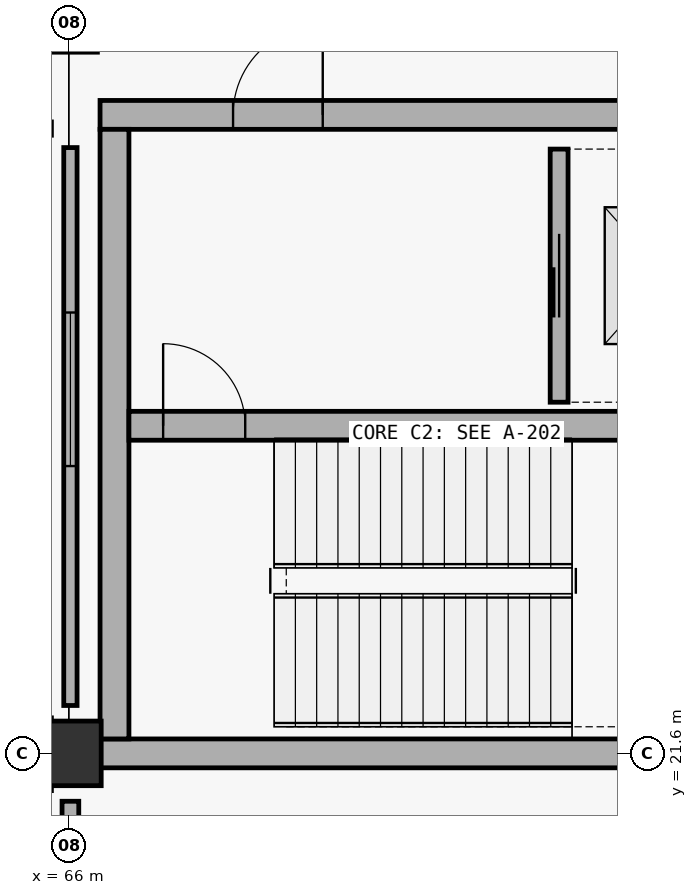
"""IFC4 building model, lengths in metres.
Left out: names, types, materials, properties, quantities, classifications, styles, units other than length and angle.
Written with IfcOpenShell. Run it as: python <this file> out.ifc"""

import sys

from ifc_helpers import new_model, si_unit, direction, frame, frame_2d, origin, origin_2d, place, context, subcontext, project, spatial, rectangle, extrude, element, fill, save


model = new_model("IFC4")
c1 = context("Model", 3, precision=1e-05, world=origin(), true_north=direction((0.0, 1.0)))
c2 = subcontext(c1, "Body", "Model", "MODEL_VIEW")
j1 = project(units=[si_unit("LENGTHUNIT", "METRE"), si_unit("PLANEANGLEUNIT", "RADIAN")], contexts=[c1])
p1 = place(None, origin())
s1 = spatial("IfcSite", under=j1, at=p1, CompositionType="ELEMENT")
p2 = place(p1, origin())
s2 = spatial("IfcBuilding", under=s1, at=p2, CompositionType="ELEMENT")
p3 = place(p2, frame((0.0, 0.0, 10.5)))
s3 = spatial("IfcBuildingStorey", under=s2, at=p3, CompositionType="ELEMENT", Elevation=10.5)
p4 = place(p3, frame((66.0, 21.6, 0.0), z_axis=(0.0, 0.0, 1.0), x_axis=(1.0, 0.0, 0.0)))
e1 = element("IfcColumn", 1, at=p4, inside=s3, PredefinedType="COLUMN", context=c2, shape_type="SweptSolid", body=[
    extrude(rectangle(XDim=0.85, YDim=0.85, at=origin_2d()), origin(), (0.0, 0.0, 1.0), 5.1),
])
p5 = place(p3, frame((66.41, 21.6, 0.0), z_axis=(0.0, 0.0, 1.0), x_axis=(1.0, 0.0, 0.0)))
e2 = element("IfcWall", 2, at=p5, inside=s3, PredefinedType="SHEAR", context=c2, shape_type="SweptSolid", body=[
    extrude(rectangle(XDim=9.38, YDim=0.38, at=frame_2d((4.69, 0.0))), origin(), (0.0, 0.0, 1.0), 5.1),
])
p6 = place(p3, frame((66.41, 30.0, 0.0), z_axis=(0.0, 0.0, 1.0), x_axis=(1.0, 0.0, 0.0)))
e3 = element("IfcWall", 3, at=p6, inside=s3, PredefinedType="SHEAR", context=c2, shape_type="SweptSolid", body=[
    extrude(rectangle(XDim=9.38, YDim=0.38, at=frame_2d((4.69, 0.0))), origin(), (0.0, 0.0, 1.0), 5.1),
])
p7 = place(p6, frame((1.75, 0.0, 0.0)))
e4 = element("IfcOpeningElement", 4, at=p7, cuts=e3, PredefinedType="OPENING", context=c2, shape_type="SweptSolid", body=[
    extrude(rectangle(XDim=1.18, YDim=2.24, at=frame_2d((0.59, 1.12))), frame((0.0, 0.2, 0.0), z_axis=(0.0, -1.0, 0.0), x_axis=(1.0, 0.0, 0.0)), (0.0, 0.0, 1.0), 0.4),
])
p8 = place(p3, frame((66.6, 21.79, 0.0), z_axis=(0.0, 0.0, 1.0), x_axis=(0.0, 1.0, 0.0)))
e5 = element("IfcWall", 5, at=p8, inside=s3, PredefinedType="SHEAR", context=c2, shape_type="SweptSolid", body=[
    extrude(rectangle(XDim=8.02, YDim=0.38, at=frame_2d((4.01, 0.0))), origin(), (0.0, 0.0, 1.0), 5.1),
])
p9 = place(p3, frame((66.79, 25.91, 0.0), z_axis=(0.0, 0.0, 1.0), x_axis=(1.0, 0.0, 0.0)))
e6 = element("IfcWall", 6, at=p9, inside=s3, PredefinedType="SHEAR", context=c2, shape_type="SweptSolid", body=[
    extrude(rectangle(XDim=8.62, YDim=0.38, at=frame_2d((4.31, 0.0))), origin(), (0.0, 0.0, 1.0), 5.1),
])
p10 = place(p9, frame((0.45, 0.0, 0.0)))
e7 = element("IfcOpeningElement", 7, at=p10, cuts=e6, PredefinedType="OPENING", context=c2, shape_type="SweptSolid", body=[
    extrude(rectangle(XDim=1.08, YDim=2.18, at=frame_2d((0.54, 1.09))), frame((0.0, 0.2, 0.0), z_axis=(0.0, -1.0, 0.0), x_axis=(1.0, 0.0, 0.0)), (0.0, 0.0, 1.0), 0.4),
])
p11 = place(p3, frame((72.45, 26.22, 0.0), z_axis=(0.0, 0.0, 1.0), x_axis=(0.0, 1.0, 0.0)))
e8 = element("IfcWall", 8, at=p11, inside=s3, PredefinedType="PARTITIONING", context=c2, shape_type="SweptSolid", body=[
    extrude(rectangle(XDim=3.33, YDim=0.235, at=frame_2d((1.665, 0.0))), origin(), (0.0, 0.0, 1.0), 4.72),
])
p12 = place(p11, frame((1.115, 0.0, 0.0)))
e9 = element("IfcOpeningElement", 9, at=p12, cuts=e8, PredefinedType="OPENING", context=c2, shape_type="SweptSolid", body=[
    extrude(rectangle(XDim=1.1, YDim=2.2, at=frame_2d((0.55, 1.1))), frame((0.0, 0.127, 0.0), z_axis=(0.0, -1.0, 0.0), x_axis=(1.0, 0.0, 0.0)), (0.0, 0.0, 1.0), 0.255),
])
p13 = place(p3, frame((66.02, 22.23, 0.0), z_axis=(0.0, 0.0, 1.0), x_axis=(0.0, 1.0, 0.0)))
e10 = element("IfcWall", 10, at=p13, inside=s3, PredefinedType="PARTITIONING", context=c2, shape_type="SweptSolid", body=[
    extrude(rectangle(XDim=7.34, YDim=0.175, at=frame_2d((3.67, 0.0))), origin(), (0.0, 0.0, 1.0), 4.0),
])
p14 = place(p13, frame((3.15, 0.0, 0.9)))
e11 = element("IfcOpeningElement", 11, at=p14, cuts=e10, PredefinedType="OPENING", context=c2, shape_type="SweptSolid", body=[
    extrude(rectangle(XDim=2.02, YDim=1.32, at=frame_2d((1.01, 0.66))), frame((0.0, 0.097, 0.0), z_axis=(0.0, -1.0, 0.0), x_axis=(1.0, 0.0, 0.0)), (0.0, 0.0, 1.0), 0.195),
])
p15 = place(p3, frame((66.02, 14.03, 0.0), z_axis=(0.0, 0.0, 1.0), x_axis=(0.0, 1.0, 0.0)))
e12 = element("IfcWall", 12, at=p15, inside=s3, PredefinedType="PARTITIONING", context=c2, shape_type="SweptSolid", body=[
    extrude(rectangle(XDim=6.94, YDim=0.22, at=frame_2d((3.47, 0.0))), origin(), (0.0, 0.0, 1.0), 4.1),
])
p16 = place(p15, frame((2.4, 0.0, 0.9)))
e13 = element("IfcOpeningElement", 13, at=p16, cuts=e12, PredefinedType="OPENING", context=c2, shape_type="SweptSolid", body=[
    extrude(rectangle(XDim=2.16, YDim=1.42, at=frame_2d((1.08, 0.71))), frame((0.0, 0.12, 0.0), z_axis=(0.0, -1.0, 0.0), x_axis=(1.0, 0.0, 0.0)), (0.0, 0.0, 1.0), 0.24),
])
p17 = place(p10, origin())
e14 = element("IfcDoor", 14, at=p17, inside=s3, OperationType="SINGLE_SWING_LEFT", PredefinedType="DOOR", context=c2, shape_type="SweptSolid", body=[
    extrude(rectangle(XDim=1.08, YDim=2.18, at=frame_2d((0.54, 1.09))), frame((0.0, 0.025, 0.0), z_axis=(0.0, -1.0, 0.0), x_axis=(1.0, 0.0, 0.0)), (0.0, 0.0, 1.0), 0.05),
])
fill(e7, e14)
p18 = place(p7, origin())
e15 = element("IfcDoor", 15, at=p18, inside=s3, OperationType="SINGLE_SWING_RIGHT", PredefinedType="DOOR", context=c2, shape_type="SweptSolid", body=[
    extrude(rectangle(XDim=1.18, YDim=2.24, at=frame_2d((0.59, 1.12))), frame((0.0, 0.025, 0.0), z_axis=(0.0, -1.0, 0.0), x_axis=(1.0, 0.0, 0.0)), (0.0, 0.0, 1.0), 0.05),
])
fill(e4, e15)
p19 = place(p12, origin())
e16 = element("IfcDoor", 16, at=p19, inside=s3, OperationType="SLIDING_TO_LEFT", PredefinedType="DOOR", context=c2, shape_type="SweptSolid", body=[
    extrude(rectangle(XDim=1.1, YDim=2.2, at=frame_2d((0.55, 1.1))), frame((0.0, 0.025, 0.0), z_axis=(0.0, -1.0, 0.0), x_axis=(1.0, 0.0, 0.0)), (0.0, 0.0, 1.0), 0.05),
])
fill(e9, e16)
p20 = place(p14, origin())
e17 = element("IfcWindow", 17, at=p20, inside=s3, PartitioningType="SINGLE_PANEL", PredefinedType="WINDOW", context=c2, shape_type="SweptSolid", body=[
    extrude(rectangle(XDim=2.02, YDim=1.32, at=frame_2d((1.01, 0.66))), frame((0.0, 0.03, 0.0), z_axis=(0.0, -1.0, 0.0), x_axis=(1.0, 0.0, 0.0)), (0.0, 0.0, 1.0), 0.06),
])
fill(e11, e17)
save(model, sys.argv[1])
